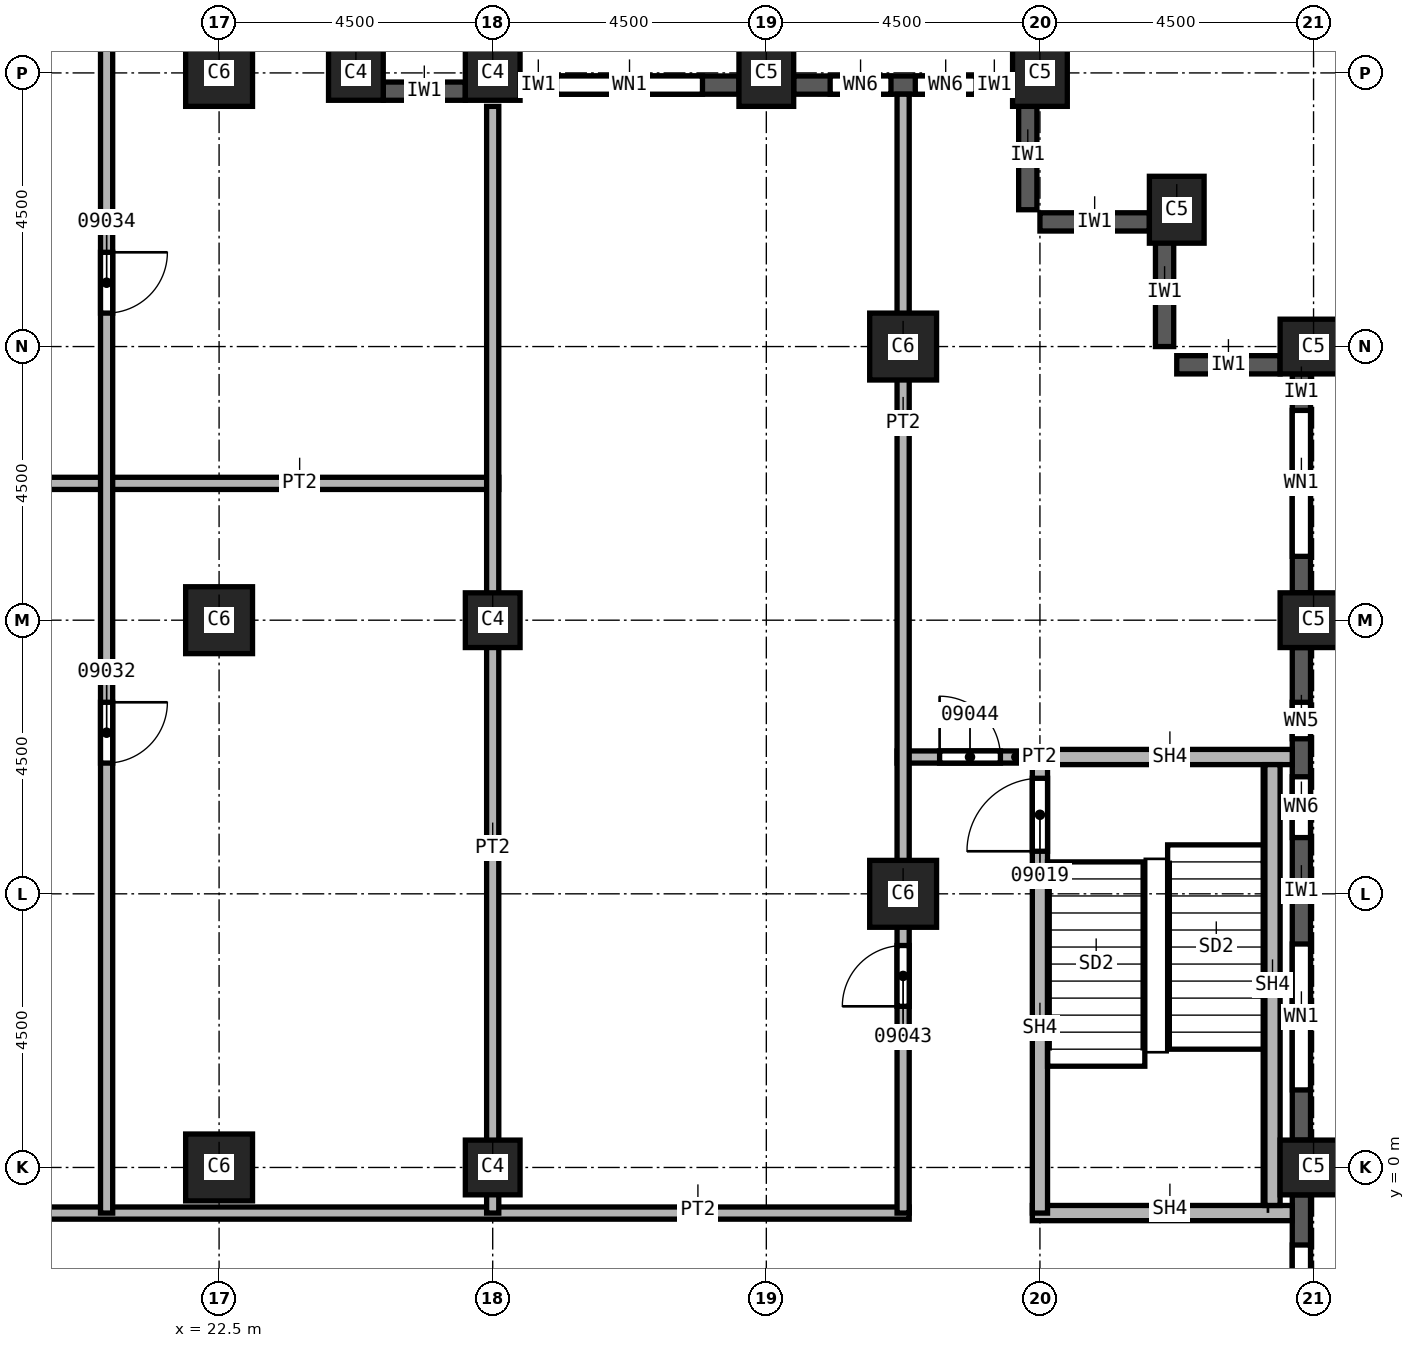
"""IFC4 building model, lengths in metres.
Left out: names, types, materials, properties, quantities, classifications, styles, units other than length and angle.
Written with IfcOpenShell. Run it as: python <this file> out.ifc"""

import sys

from ifc_helpers import new_model, si_unit, direction, frame, frame_2d, origin, origin_2d, place, context, subcontext, project, spatial, rectangle, extrude, element, fill, save


model = new_model("IFC4")
c1 = context("Model", 3, precision=1e-05, world=origin(), true_north=direction((0.0, 1.0)))
c2 = subcontext(c1, "Body", "Model", "MODEL_VIEW")
j1 = project(units=[si_unit("LENGTHUNIT", "METRE"), si_unit("PLANEANGLEUNIT", "RADIAN")], contexts=[c1])
p1 = place(None, origin())
s1 = spatial("IfcSite", under=j1, at=p1, CompositionType="ELEMENT")
p2 = place(p1, origin())
s2 = spatial("IfcBuilding", under=s1, at=p2, CompositionType="ELEMENT")
p3 = place(p2, frame((0.0, 0.0, 162.0)))
s3 = spatial("IfcBuildingStorey", under=s2, at=p3, CompositionType="ELEMENT", Elevation=162.0)
for number, where, z_axis, x_axis in (
    (1, (40.5, 0.0, 0.0), (0.0, 0.0, 1.0), (0.0, 1.0, 0.0)),
    (2, (40.5, 9.0, 0.0), (0.0, 0.0, 1.0), (0.0, 1.0, 0.0)),
    (3, (40.5, 13.5, 0.0), (0.0, 0.0, 1.0), (0.0, 1.0, 0.0)),
    (4, (38.25, 15.75, 0.0), (0.0, 0.0, 1.0), (1.0, 0.0, 0.0)),
    (5, (31.5, 18.0, 0.0), (0.0, 0.0, 1.0), (1.0, 0.0, 0.0)),
    (6, (36.0, 18.0, 0.0), (0.0, 0.0, 1.0), (1.0, 0.0, 0.0)),
):
    element("IfcColumn", number, at=place(p3, frame(where, z_axis=z_axis, x_axis=x_axis)), inside=s3, PredefinedType="COLUMN", context=c2, shape_type="SweptSolid", body=[
        extrude(rectangle(XDim=0.9, YDim=1.1, at=origin_2d()), origin(), (0.0, 0.0, 1.0), 3.7),
    ])
for number, where, z_axis, x_axis in (
    (7, (33.75, 4.5, 0.0), (0.0, 0.0, 1.0), (1.0, 0.0, 0.0)),
    (8, (33.75, 13.5, 0.0), (0.0, 0.0, 1.0), (1.0, 0.0, 0.0)),
    (9, (22.5, 0.0, 0.0), (0.0, 0.0, 1.0), (1.0, 0.0, 0.0)),
    (10, (22.5, 9.0, 0.0), (0.0, 0.0, 1.0), (1.0, 0.0, 0.0)),
    (11, (22.5, 18.0, 0.0), (0.0, 0.0, 1.0), (1.0, 0.0, 0.0)),
):
    element("IfcColumn", number, at=place(p3, frame(where, z_axis=z_axis, x_axis=x_axis)), inside=s3, PredefinedType="COLUMN", context=c2, shape_type="SweptSolid", body=[
        extrude(rectangle(XDim=1.1, YDim=1.1, at=origin_2d()), origin(), (0.0, 0.0, 1.0), 3.7),
    ])
for number, where, z_axis, x_axis in (
    (12, (27.0, 0.0, 0.0), (0.0, 0.0, 1.0), (1.0, 0.0, 0.0)),
    (13, (27.0, 9.0, 0.0), (0.0, 0.0, 1.0), (1.0, 0.0, 0.0)),
    (14, (27.0, 18.0, 0.0), (0.0, 0.0, 1.0), (1.0, 0.0, 0.0)),
    (15, (24.75, 18.0, 0.0), (0.0, 0.0, 1.0), (1.0, 0.0, 0.0)),
):
    element("IfcColumn", number, at=place(p3, frame(where, z_axis=z_axis, x_axis=x_axis)), inside=s3, PredefinedType="COLUMN", context=c2, shape_type="SweptSolid", body=[
        extrude(rectangle(XDim=0.9, YDim=0.9, at=origin_2d()), origin(), (0.0, 0.0, 1.0), 3.7),
    ])
p4 = place(p3, frame((39.95, 13.2, 0.0), z_axis=(0.0, 0.0, 1.0), x_axis=(-1.0, 0.0, 0.0)))
e16 = element("IfcWall", 16, at=p4, inside=s3, PredefinedType="SOLIDWALL", context=c2, shape_type="SweptSolid", body=[
    extrude(rectangle(XDim=1.7, YDim=0.3, at=frame_2d((0.85, 0.0))), origin(), (0.0, 0.0, 1.0), 3.1),
])
for number, where, z_axis, x_axis in (
    (17, (38.05, 15.3, 0.0), (0.0, 0.0, 1.0), (0.0, -1.0, 0.0)),
    (18, (37.8, 15.55, 0.0), (0.0, 0.0, 1.0), (-1.0, 0.0, 0.0)),
    (19, (35.8, 17.55, 0.0), (0.0, 0.0, 1.0), (0.0, -1.0, 0.0)),
):
    element("IfcWall", number, at=place(p3, frame(where, z_axis=z_axis, x_axis=x_axis)), inside=s3, PredefinedType="SOLIDWALL", context=c2, shape_type="SweptSolid", body=[
        extrude(rectangle(XDim=1.8, YDim=0.3, at=frame_2d((0.9, 0.0))), origin(), (0.0, 0.0, 1.0), 3.1),
    ])
p5 = place(p3, frame((40.3, -8.55, 0.0), z_axis=(0.0, 0.0, 1.0), x_axis=(0.0, 1.0, 0.0)))
e20 = element("IfcWall", 20, at=p5, inside=s3, PredefinedType="SOLIDWALL", context=c2, shape_type="SweptSolid", body=[
    extrude(rectangle(XDim=8.1, YDim=0.3, at=frame_2d((4.05, 0.0))), origin(), (0.0, 0.0, 1.0), 3.1),
])
p6 = place(p5, frame((0.825, 0.0, 0.8)))
e21 = element("IfcOpeningElement", 21, at=p6, cuts=e20, PredefinedType="OPENING", context=c2, shape_type="SweptSolid", body=[
    extrude(rectangle(XDim=2.4, YDim=1.95, at=frame_2d((1.2, 0.975))), frame((0.0, 0.15, 0.0), z_axis=(0.0, -1.0, 0.0), x_axis=(1.0, 0.0, 0.0)), (0.0, 0.0, 1.0), 0.3),
])
p7 = place(p5, frame((4.875, 0.0, 0.8)))
e22 = element("IfcOpeningElement", 22, at=p7, cuts=e20, PredefinedType="OPENING", context=c2, shape_type="SweptSolid", body=[
    extrude(rectangle(XDim=2.4, YDim=1.95, at=frame_2d((1.2, 0.975))), frame((0.0, 0.15, 0.0), z_axis=(0.0, -1.0, 0.0), x_axis=(1.0, 0.0, 0.0)), (0.0, 0.0, 1.0), 0.3),
])
p8 = place(p3, frame((40.3, 0.45, 0.0), z_axis=(0.0, 0.0, 1.0), x_axis=(0.0, 1.0, 0.0)))
e23 = element("IfcWall", 23, at=p8, inside=s3, PredefinedType="SOLIDWALL", context=c2, shape_type="SweptSolid", body=[
    extrude(rectangle(XDim=8.1, YDim=0.3, at=frame_2d((4.05, 0.0))), origin(), (0.0, 0.0, 1.0), 3.1),
])
p9 = place(p8, frame((0.825, 0.0, 0.8)))
e24 = element("IfcOpeningElement", 24, at=p9, cuts=e23, PredefinedType="OPENING", context=c2, shape_type="SweptSolid", body=[
    extrude(rectangle(XDim=2.4, YDim=1.95, at=frame_2d((1.2, 0.975))), frame((0.0, 0.15, 0.0), z_axis=(0.0, -1.0, 0.0), x_axis=(1.0, 0.0, 0.0)), (0.0, 0.0, 1.0), 0.3),
])
p10 = place(p8, frame((4.975, 0.0, 0.8)))
e25 = element("IfcOpeningElement", 25, at=p10, cuts=e23, PredefinedType="OPENING", context=c2, shape_type="SweptSolid", body=[
    extrude(rectangle(XDim=1.0, YDim=1.95, at=frame_2d((0.5, 0.975))), frame((0.0, 0.15, 0.0), z_axis=(0.0, -1.0, 0.0), x_axis=(1.0, 0.0, 0.0)), (0.0, 0.0, 1.0), 0.3),
])
p11 = place(p8, frame((6.6, 0.0, 0.8)))
e26 = element("IfcOpeningElement", 26, at=p11, cuts=e23, PredefinedType="OPENING", context=c2, shape_type="SweptSolid", body=[
    extrude(rectangle(XDim=0.6, YDim=1.95, at=frame_2d((0.3, 0.975))), frame((0.0, 0.15, 0.0), z_axis=(0.0, -1.0, 0.0), x_axis=(1.0, 0.0, 0.0)), (0.0, 0.0, 1.0), 0.3),
])
p12 = place(p3, frame((40.3, 9.45, 0.0), z_axis=(0.0, 0.0, 1.0), x_axis=(0.0, 1.0, 0.0)))
e27 = element("IfcWall", 27, at=p12, inside=s3, PredefinedType="SOLIDWALL", context=c2, shape_type="SweptSolid", body=[
    extrude(rectangle(XDim=3.6, YDim=0.3, at=frame_2d((1.8, 0.0))), origin(), (0.0, 0.0, 1.0), 3.1),
])
p13 = place(p12, frame((0.6, 0.0, 0.8)))
e28 = element("IfcOpeningElement", 28, at=p13, cuts=e27, PredefinedType="OPENING", context=c2, shape_type="SweptSolid", body=[
    extrude(rectangle(XDim=2.4, YDim=1.95, at=frame_2d((1.2, 0.975))), frame((0.0, 0.15, 0.0), z_axis=(0.0, -1.0, 0.0), x_axis=(1.0, 0.0, 0.0)), (0.0, 0.0, 1.0), 0.3),
])
p14 = place(p3, frame((35.55, 17.8, 0.0), z_axis=(0.0, 0.0, 1.0), x_axis=(-1.0, 0.0, 0.0)))
e29 = element("IfcWall", 29, at=p14, inside=s3, PredefinedType="SOLIDWALL", context=c2, shape_type="SweptSolid", body=[
    extrude(rectangle(XDim=3.6, YDim=0.3, at=frame_2d((1.8, 0.0))), origin(), (0.0, 0.0, 1.0), 3.1),
])
p15 = place(p14, frame((0.6, 0.0, 0.8)))
e30 = element("IfcOpeningElement", 30, at=p15, cuts=e29, PredefinedType="OPENING", context=c2, shape_type="SweptSolid", body=[
    extrude(rectangle(XDim=1.0, YDim=1.95, at=frame_2d((0.5, 0.975))), frame((0.0, 0.15, 0.0), z_axis=(0.0, -1.0, 0.0), x_axis=(1.0, 0.0, 0.0)), (0.0, 0.0, 1.0), 0.3),
])
p16 = place(p14, frame((2.0, 0.0, 0.8)))
e31 = element("IfcOpeningElement", 31, at=p16, cuts=e29, PredefinedType="OPENING", context=c2, shape_type="SweptSolid", body=[
    extrude(rectangle(XDim=1.0, YDim=1.95, at=frame_2d((0.5, 0.975))), frame((0.0, 0.15, 0.0), z_axis=(0.0, -1.0, 0.0), x_axis=(1.0, 0.0, 0.0)), (0.0, 0.0, 1.0), 0.3),
])
p17 = place(p3, frame((31.05, 17.8, 0.0), z_axis=(0.0, 0.0, 1.0), x_axis=(-1.0, 0.0, 0.0)))
e32 = element("IfcWall", 32, at=p17, inside=s3, PredefinedType="SOLIDWALL", context=c2, shape_type="SweptSolid", body=[
    extrude(rectangle(XDim=3.6, YDim=0.3, at=frame_2d((1.8, 0.0))), origin(), (0.0, 0.0, 1.0), 3.1),
])
p18 = place(p17, frame((0.6, 0.0, 0.8)))
e33 = element("IfcOpeningElement", 33, at=p18, cuts=e32, PredefinedType="OPENING", context=c2, shape_type="SweptSolid", body=[
    extrude(rectangle(XDim=2.4, YDim=1.95, at=frame_2d((1.2, 0.975))), frame((0.0, 0.15, 0.0), z_axis=(0.0, -1.0, 0.0), x_axis=(1.0, 0.0, 0.0)), (0.0, 0.0, 1.0), 0.3),
])
p19 = place(p3, frame((26.55, 17.7, 0.0), z_axis=(0.0, 0.0, 1.0), x_axis=(-1.0, 0.0, 0.0)))
e34 = element("IfcWall", 34, at=p19, inside=s3, PredefinedType="SOLIDWALL", context=c2, shape_type="SweptSolid", body=[
    extrude(rectangle(XDim=1.35, YDim=0.3, at=frame_2d((0.675, 0.0))), origin(), (0.0, 0.0, 1.0), 3.1),
])
p20 = place(p3, frame((15.4, -0.75, 0.0), z_axis=(0.0, 0.0, 1.0), x_axis=(1.0, 0.0, 0.0)))
e35 = element("IfcWall", 35, at=p20, inside=s3, PredefinedType="PARTITIONING", context=c2, shape_type="SweptSolid", body=[
    extrude(rectangle(XDim=18.45, YDim=0.2, at=frame_2d((9.225, 0.0))), origin(), (0.0, 0.0, 1.0), 3.7),
])
p21 = place(p3, frame((15.4, 11.25, 0.0), z_axis=(0.0, 0.0, 1.0), x_axis=(1.0, 0.0, 0.0)))
e36 = element("IfcWall", 36, at=p21, inside=s3, PredefinedType="PARTITIONING", context=c2, shape_type="SweptSolid", body=[
    extrude(rectangle(XDim=11.7, YDim=0.2, at=frame_2d((5.85, 0.0))), origin(), (0.0, 0.0, 1.0), 3.7),
])
p22 = place(p3, frame((20.65, 23.25, 0.0), z_axis=(0.0, 0.0, 1.0), x_axis=(0.0, -1.0, 0.0)))
e37 = element("IfcWall", 37, at=p22, inside=s3, PredefinedType="PARTITIONING", context=c2, shape_type="SweptSolid", body=[
    extrude(rectangle(XDim=24.0, YDim=0.2, at=frame_2d((12.0, 0.0))), origin(), (0.0, 0.0, 1.0), 3.7),
])
p23 = place(p22, frame((15.6, 0.0, 0.0)))
e38 = element("IfcOpeningElement", 38, at=p23, cuts=e37, PredefinedType="OPENING", context=c2, shape_type="SweptSolid", body=[
    extrude(rectangle(XDim=1.0, YDim=2.1, at=frame_2d((0.5, 1.05))), frame((0.0, 0.1, 0.0), z_axis=(0.0, -1.0, 0.0), x_axis=(1.0, 0.0, 0.0)), (0.0, 0.0, 1.0), 0.2),
])
p24 = place(p22, frame((8.2, 0.0, 0.0)))
e39 = element("IfcOpeningElement", 39, at=p24, cuts=e37, PredefinedType="OPENING", context=c2, shape_type="SweptSolid", body=[
    extrude(rectangle(XDim=1.0, YDim=2.1, at=frame_2d((0.5, 1.05))), frame((0.0, 0.1, 0.0), z_axis=(0.0, -1.0, 0.0), x_axis=(1.0, 0.0, 0.0)), (0.0, 0.0, 1.0), 0.2),
])
p25 = place(p3, frame((27.0, 17.45, 0.0), z_axis=(0.0, 0.0, 1.0), x_axis=(0.0, -1.0, 0.0)))
e40 = element("IfcWall", 40, at=p25, inside=s3, PredefinedType="PARTITIONING", context=c2, shape_type="SweptSolid", body=[
    extrude(rectangle(XDim=18.2, YDim=0.2, at=frame_2d((9.1, 0.0))), origin(), (0.0, 0.0, 1.0), 3.7),
])
p26 = place(p3, frame((33.65, 6.75, 0.0), z_axis=(0.0, 0.0, 1.0), x_axis=(1.0, 0.0, 0.0)))
e41 = element("IfcWall", 41, at=p26, inside=s3, PredefinedType="PARTITIONING", context=c2, shape_type="SweptSolid", body=[
    extrude(rectangle(XDim=2.35, YDim=0.2, at=frame_2d((1.175, 0.0))), origin(), (0.0, 0.0, 1.0), 3.7),
])
p27 = place(p26, frame((0.7, 0.0, 0.0)))
e42 = element("IfcOpeningElement", 42, at=p27, cuts=e41, PredefinedType="OPENING", context=c2, shape_type="SweptSolid", body=[
    extrude(rectangle(XDim=1.0, YDim=2.1, at=frame_2d((0.5, 1.05))), frame((0.0, 0.1, 0.0), z_axis=(0.0, -1.0, 0.0), x_axis=(1.0, 0.0, 0.0)), (0.0, 0.0, 1.0), 0.2),
])
p28 = place(p3, frame((33.75, -0.75, 0.0), z_axis=(0.0, 0.0, 1.0), x_axis=(0.0, 1.0, 0.0)))
e43 = element("IfcWall", 43, at=p28, inside=s3, PredefinedType="PARTITIONING", context=c2, shape_type="SweptSolid", body=[
    extrude(rectangle(XDim=18.4, YDim=0.2, at=frame_2d((9.2, 0.0))), origin(), (0.0, 0.0, 1.0), 3.7),
])
p29 = place(p28, frame((3.4, 0.0, 0.0)))
e44 = element("IfcOpeningElement", 44, at=p29, cuts=e43, PredefinedType="OPENING", context=c2, shape_type="SweptSolid", body=[
    extrude(rectangle(XDim=1.0, YDim=2.1, at=frame_2d((0.5, 1.05))), frame((0.0, 0.1, 0.0), z_axis=(0.0, -1.0, 0.0), x_axis=(1.0, 0.0, 0.0)), (0.0, 0.0, 1.0), 0.2),
])
p30 = place(p3, frame((35.875, -0.75, 0.0), z_axis=(0.0, 0.0, 1.0), x_axis=(1.0, 0.0, 0.0)))
e45 = element("IfcWall", 45, at=p30, inside=s3, PredefinedType="SOLIDWALL", context=c2, shape_type="SweptSolid", body=[
    extrude(rectangle(XDim=4.275, YDim=0.25, at=frame_2d((2.137, 0.0))), origin(), (0.0, 0.0, 1.0), 3.7),
])
p31 = place(p3, frame((36.0, -0.75, 0.0), z_axis=(0.0, 0.0, 1.0), x_axis=(0.0, 1.0, 0.0)))
e46 = element("IfcWall", 46, at=p31, inside=s3, PredefinedType="SOLIDWALL", context=c2, shape_type="SweptSolid", body=[
    extrude(rectangle(XDim=7.625, YDim=0.25, at=frame_2d((3.812, 0.0))), origin(), (0.0, 0.0, 1.0), 3.7),
])
p32 = place(p31, frame((5.95, 0.0, 0.0)))
e47 = element("IfcOpeningElement", 47, at=p32, cuts=e46, PredefinedType="OPENING", context=c2, shape_type="SweptSolid", body=[
    extrude(rectangle(XDim=1.2, YDim=2.1, at=frame_2d((0.6, 1.05))), frame((0.0, 0.125, 0.0), z_axis=(0.0, -1.0, 0.0), x_axis=(1.0, 0.0, 0.0)), (0.0, 0.0, 1.0), 0.25),
])
p33 = place(p3, frame((36.0, 6.75, 0.0), z_axis=(0.0, 0.0, 1.0), x_axis=(1.0, 0.0, 0.0)))
e48 = element("IfcWall", 48, at=p33, inside=s3, PredefinedType="SOLIDWALL", context=c2, shape_type="SweptSolid", body=[
    extrude(rectangle(XDim=4.15, YDim=0.25, at=frame_2d((2.075, 0.0))), origin(), (0.0, 0.0, 1.0), 3.7),
])
p34 = place(p3, frame((39.825, -0.625, 0.0), z_axis=(0.0, 0.0, 1.0), x_axis=(0.0, 1.0, 0.0)))
e49 = element("IfcWall", 49, at=p34, inside=s3, PredefinedType="SOLIDWALL", context=c2, shape_type="SweptSolid", body=[
    extrude(rectangle(XDim=7.25, YDim=0.25, at=frame_2d((3.625, 0.0))), origin(), (0.0, 0.0, 1.0), 3.7),
])
p35 = place(p7, origin())
e50 = element("IfcWindow", 50, at=p35, inside=s3, PartitioningType="SINGLE_PANEL", PredefinedType="WINDOW", context=c2, shape_type="SweptSolid", body=[
    extrude(rectangle(XDim=2.4, YDim=1.95, at=frame_2d((1.2, 0.975))), frame((0.0, 0.03, 0.0), z_axis=(0.0, -1.0, 0.0), x_axis=(1.0, 0.0, 0.0)), (0.0, 0.0, 1.0), 0.06),
])
fill(e22, e50)
p36 = place(p9, origin())
e51 = element("IfcWindow", 51, at=p36, inside=s3, PartitioningType="SINGLE_PANEL", PredefinedType="WINDOW", context=c2, shape_type="SweptSolid", body=[
    extrude(rectangle(XDim=2.4, YDim=1.95, at=frame_2d((1.2, 0.975))), frame((0.0, 0.03, 0.0), z_axis=(0.0, -1.0, 0.0), x_axis=(1.0, 0.0, 0.0)), (0.0, 0.0, 1.0), 0.06),
])
fill(e24, e51)
p37 = place(p13, origin())
e52 = element("IfcWindow", 52, at=p37, inside=s3, PartitioningType="SINGLE_PANEL", PredefinedType="WINDOW", context=c2, shape_type="SweptSolid", body=[
    extrude(rectangle(XDim=2.4, YDim=1.95, at=frame_2d((1.2, 0.975))), frame((0.0, 0.03, 0.0), z_axis=(0.0, -1.0, 0.0), x_axis=(1.0, 0.0, 0.0)), (0.0, 0.0, 1.0), 0.06),
])
fill(e28, e52)
p38 = place(p18, origin())
e53 = element("IfcWindow", 53, at=p38, inside=s3, PartitioningType="SINGLE_PANEL", PredefinedType="WINDOW", context=c2, shape_type="SweptSolid", body=[
    extrude(rectangle(XDim=2.4, YDim=1.95, at=frame_2d((1.2, 0.975))), frame((0.0, 0.03, 0.0), z_axis=(0.0, -1.0, 0.0), x_axis=(1.0, 0.0, 0.0)), (0.0, 0.0, 1.0), 0.06),
])
fill(e33, e53)
p39 = place(p32, origin())
e54 = element("IfcDoor", 54, at=p39, inside=s3, OperationType="SINGLE_SWING_RIGHT", PredefinedType="DOOR", context=c2, shape_type="SweptSolid", body=[
    extrude(rectangle(XDim=1.2, YDim=2.1, at=frame_2d((0.6, 1.05))), frame((0.0, 0.025, 0.0), z_axis=(0.0, -1.0, 0.0), x_axis=(1.0, 0.0, 0.0)), (0.0, 0.0, 1.0), 0.05),
])
fill(e47, e54)
p40 = place(p23, origin())
e55 = element("IfcDoor", 55, at=p40, inside=s3, OperationType="SINGLE_SWING_LEFT", PredefinedType="DOOR", context=c2, shape_type="SweptSolid", body=[
    extrude(rectangle(XDim=1.0, YDim=2.1, at=frame_2d((0.5, 1.05))), frame((0.0, 0.025, 0.0), z_axis=(0.0, -1.0, 0.0), x_axis=(1.0, 0.0, 0.0)), (0.0, 0.0, 1.0), 0.05),
])
fill(e38, e55)
p41 = place(p24, origin())
e56 = element("IfcDoor", 56, at=p41, inside=s3, OperationType="SINGLE_SWING_LEFT", PredefinedType="DOOR", context=c2, shape_type="SweptSolid", body=[
    extrude(rectangle(XDim=1.0, YDim=2.1, at=frame_2d((0.5, 1.05))), frame((0.0, 0.025, 0.0), z_axis=(0.0, -1.0, 0.0), x_axis=(1.0, 0.0, 0.0)), (0.0, 0.0, 1.0), 0.05),
])
fill(e39, e56)
p42 = place(p29, origin())
e57 = element("IfcDoor", 57, at=p42, inside=s3, OperationType="SINGLE_SWING_RIGHT", PredefinedType="DOOR", context=c2, shape_type="SweptSolid", body=[
    extrude(rectangle(XDim=1.0, YDim=2.1, at=frame_2d((0.5, 1.05))), frame((0.0, 0.025, 0.0), z_axis=(0.0, -1.0, 0.0), x_axis=(1.0, 0.0, 0.0)), (0.0, 0.0, 1.0), 0.05),
])
fill(e44, e57)
p43 = place(p27, origin())
e58 = element("IfcDoor", 58, at=p43, inside=s3, OperationType="SINGLE_SWING_LEFT", PredefinedType="DOOR", context=c2, shape_type="SweptSolid", body=[
    extrude(rectangle(XDim=1.0, YDim=2.1, at=frame_2d((0.5, 1.05))), frame((0.0, 0.025, 0.0), z_axis=(0.0, -1.0, 0.0), x_axis=(1.0, 0.0, 0.0)), (0.0, 0.0, 1.0), 0.05),
])
fill(e42, e58)
p44 = place(p10, origin())
e59 = element("IfcWindow", 59, at=p44, inside=s3, PartitioningType="SINGLE_PANEL", PredefinedType="WINDOW", context=c2, shape_type="SweptSolid", body=[
    extrude(rectangle(XDim=1.0, YDim=1.95, at=frame_2d((0.5, 0.975))), frame((0.0, 0.03, 0.0), z_axis=(0.0, -1.0, 0.0), x_axis=(1.0, 0.0, 0.0)), (0.0, 0.0, 1.0), 0.06),
])
fill(e25, e59)
p45 = place(p11, origin())
e60 = element("IfcWindow", 60, at=p45, inside=s3, PartitioningType="SINGLE_PANEL", PredefinedType="WINDOW", context=c2, shape_type="SweptSolid", body=[
    extrude(rectangle(XDim=0.6, YDim=1.95, at=frame_2d((0.3, 0.975))), frame((0.0, 0.03, 0.0), z_axis=(0.0, -1.0, 0.0), x_axis=(1.0, 0.0, 0.0)), (0.0, 0.0, 1.0), 0.06),
])
fill(e26, e60)
p46 = place(p15, origin())
e61 = element("IfcWindow", 61, at=p46, inside=s3, PartitioningType="SINGLE_PANEL", PredefinedType="WINDOW", context=c2, shape_type="SweptSolid", body=[
    extrude(rectangle(XDim=1.0, YDim=1.95, at=frame_2d((0.5, 0.975))), frame((0.0, 0.03, 0.0), z_axis=(0.0, -1.0, 0.0), x_axis=(1.0, 0.0, 0.0)), (0.0, 0.0, 1.0), 0.06),
])
fill(e30, e61)
p47 = place(p16, origin())
e62 = element("IfcWindow", 62, at=p47, inside=s3, PartitioningType="SINGLE_PANEL", PredefinedType="WINDOW", context=c2, shape_type="SweptSolid", body=[
    extrude(rectangle(XDim=1.0, YDim=1.95, at=frame_2d((0.5, 0.975))), frame((0.0, 0.03, 0.0), z_axis=(0.0, -1.0, 0.0), x_axis=(1.0, 0.0, 0.0)), (0.0, 0.0, 1.0), 0.06),
])
fill(e31, e62)
save(model, sys.argv[1])
